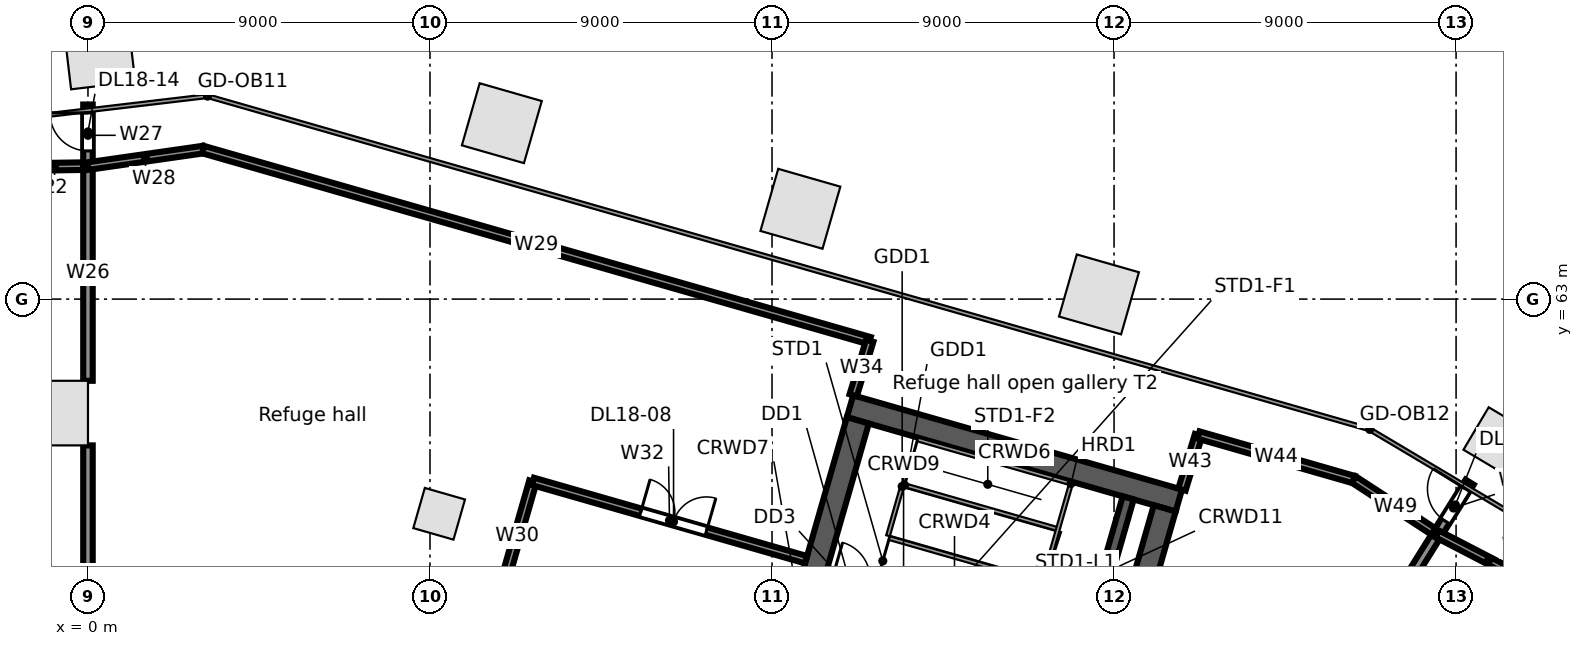
"""IFC4 building model, lengths in metres.
Left out: names, types, materials, properties, quantities, classifications, styles, units other than length and angle.
Written with IfcOpenShell. Run it as: python <this file> out.ifc"""

import sys

from ifc_helpers import new_model, si_unit, direction, frame, frame_2d, origin, origin_2d, place, context, subcontext, project, spatial, rectangle, extrude, element, fill, save


model = new_model("IFC4")
c1 = context("Model", 3, precision=1e-05, world=origin(), true_north=direction((0.0, 1.0)))
c2 = subcontext(c1, "Body", "Model", "MODEL_VIEW")
j1 = project(units=[si_unit("LENGTHUNIT", "METRE"), si_unit("PLANEANGLEUNIT", "RADIAN")], contexts=[c1])
p1 = place(None, origin())
s1 = spatial("IfcSite", under=j1, at=p1, CompositionType="ELEMENT")
p2 = place(p1, origin())
s2 = spatial("IfcBuilding", under=s1, at=p2, CompositionType="ELEMENT")
p3 = place(p2, frame((0.0, 0.0, 91.5)))
s3 = spatial("IfcBuildingStorey", under=s2, at=p3, CompositionType="ELEMENT", Elevation=91.5)
p4 = place(p3, frame((37.085, 59.262, 0.0), z_axis=(0.0, 0.0, 1.0), x_axis=(-0.859406411501, 0.511293086077, 0.0)))
e1 = element("IfcColumn", 1, at=p4, inside=s3, PredefinedType="COLUMN", context=c2, shape_type="SweptSolid", body=[
    extrude(rectangle(XDim=1.3, YDim=1.3, at=origin_2d()), origin(), (0.0, 0.0, 1.0), 5.6),
])
for number, where, z_axis, x_axis in (
    (2, (26.603, 63.124, 0.0), (0.0, 0.0, 1.0), (-0.961, 0.276, 0.0)),
    (3, (18.746, 65.376, 0.0), (0.0, 0.0, 1.0), (-0.961, 0.276, 0.0)),
    (4, (10.89, 67.629, 0.0), (0.0, 0.0, 1.0), (-0.961, 0.276, 0.0)),
    (5, (0.3, 69.464, 0.0), (0.0, 0.0, 1.0), (-0.993, -0.118, 0.0)),
    (6, (-0.85, 60.0, 0.0), (0.0, 0.0, 1.0), (0.0, 1.0, 0.0)),
):
    element("IfcColumn", number, at=place(p3, frame(where, z_axis=z_axis, x_axis=x_axis)), inside=s3, PredefinedType="COLUMN", context=c2, shape_type="SweptSolid", body=[
        extrude(rectangle(XDim=1.7, YDim=1.7, at=origin_2d()), origin(), (0.0, 0.0, 1.0), 5.6),
    ])
p5 = place(p3, frame((9.241, 57.35, 0.0), z_axis=(0.0, 0.0, 1.0), x_axis=(0.961261695938, -0.275637355817, 0.0)))
e7 = element("IfcColumn", 7, at=p5, inside=s3, PredefinedType="COLUMN", context=c2, shape_type="SweptSolid", body=[
    extrude(rectangle(XDim=1.1, YDim=1.1, at=origin_2d()), origin(), (0.0, 0.0, 1.0), 5.6),
])
p6 = place(p3, frame((20.053, 60.18, 0.0), z_axis=(0.0, 0.0, 1.0), x_axis=(0.96126248289, -0.275634611374, 0.0)))
e8 = element("IfcWall", 8, at=p6, inside=s3, PredefinedType="SOLIDWALL", context=c2, shape_type="SweptSolid", body=[
    extrude(rectangle(XDim=9.0, YDim=0.6, at=frame_2d((4.5, 0.0))), origin(), (0.0, 0.0, 1.0), 5.28),
])
p7 = place(p3, frame((17.282, 49.427, 0.0), z_axis=(0.0, 0.0, 1.0), x_axis=(0.275631631629, 0.961263337304, 0.0)))
e9 = element("IfcWall", 9, at=p7, inside=s3, PredefinedType="SOLIDWALL", context=c2, shape_type="SweptSolid", body=[
    extrude(rectangle(XDim=10.8, YDim=0.6, at=frame_2d((5.4, 0.0))), origin(), (0.0, 0.0, 1.0), 5.28),
])
p8 = place(p7, frame((4.8, 0.0, 0.0)))
e10 = element("IfcOpeningElement", 10, at=p8, cuts=e9, PredefinedType="OPENING", context=c2, shape_type="SweptSolid", body=[
    extrude(rectangle(XDim=1.2, YDim=2.1, at=frame_2d((0.6, 1.05))), frame((0.0, 0.31, 0.0), z_axis=(0.0, -1.0, 0.0), x_axis=(1.0, 0.0, 0.0)), (0.0, 0.0, 1.0), 0.62),
])
p9 = place(p3, frame((26.256, 53.876, 0.0), z_axis=(0.0, 0.0, 1.0), x_axis=(0.275612739511, 0.961268754209, 0.0)))
e11 = element("IfcWall", 11, at=p9, inside=s3, PredefinedType="SOLIDWALL", context=c2, shape_type="SweptSolid", body=[
    extrude(rectangle(XDim=4.05, YDim=0.3, at=frame_2d((2.025, 0.0))), origin(), (0.0, 0.0, 1.0), 5.28),
])
p10 = place(p3, frame((25.356, 47.112, 0.0), z_axis=(0.0, 0.0, 1.0), x_axis=(0.275631631629, 0.961263337304, 0.0)))
e12 = element("IfcWall", 12, at=p10, inside=s3, PredefinedType="SOLIDWALL", context=c2, shape_type="SweptSolid", body=[
    extrude(rectangle(XDim=10.8, YDim=0.6, at=frame_2d((5.4, 0.0))), origin(), (0.0, 0.0, 1.0), 5.28),
])
p11 = place(p10, frame((4.8, 0.0, 0.0)))
e13 = element("IfcOpeningElement", 13, at=p11, cuts=e12, PredefinedType="OPENING", context=c2, shape_type="SweptSolid", body=[
    extrude(rectangle(XDim=1.2, YDim=2.1, at=frame_2d((0.6, 1.05))), frame((0.0, 0.31, 0.0), z_axis=(0.0, -1.0, 0.0), x_axis=(1.0, 0.0, 0.0)), (0.0, 0.0, 1.0), 0.62),
])
p12 = place(p3, frame((-1.757, 66.474, 0.0), z_axis=(0.0, 0.0, 1.0), x_axis=(0.999891555363, 0.014726761827, 0.0)))
e14 = element("IfcWall", 14, at=p12, inside=s3, PredefinedType="PARTITIONING", context=c2, shape_type="SweptSolid", body=[
    extrude(rectangle(XDim=1.757, YDim=0.2, at=frame_2d((0.879, 0.0))), origin(), (0.0, 0.0, 1.0), 4.552),
])
p13 = place(p3, frame((0.0, 52.25, 0.0), z_axis=(0.0, 0.0, 1.0), x_axis=(0.0, 1.0, 0.0)))
e15 = element("IfcWall", 15, at=p13, inside=s3, PredefinedType="PARTITIONING", context=c2, shape_type="SweptSolid", body=[
    extrude(rectangle(XDim=6.9, YDim=0.25, at=frame_2d((3.45, 0.0))), origin(), (0.0, 0.0, 1.0), 5.28),
])
p14 = place(p3, frame((0.0, 60.85, 0.0), z_axis=(0.0, 0.0, 1.0), x_axis=(0.0, 1.0, 0.0)))
e16 = element("IfcWall", 16, at=p14, inside=s3, PredefinedType="PARTITIONING", context=c2, shape_type="SweptSolid", body=[
    extrude(rectangle(XDim=5.65, YDim=0.25, at=frame_2d((2.825, 0.0))), origin(), (0.0, 0.0, 1.0), 4.552),
])
p15 = place(p3, frame((0.0, 66.5, 0.0), z_axis=(0.0, 0.0, 1.0), x_axis=(0.0, 1.0, 0.0)))
e17 = element("IfcWall", 17, at=p15, inside=s3, PredefinedType="PARTITIONING", context=c2, shape_type="SweptSolid", body=[
    extrude(rectangle(XDim=1.62, YDim=0.25, at=frame_2d((0.81, 0.0))), origin(), (0.0, 0.0, 1.0), 4.552),
])
p16 = place(p15, frame((0.4, 0.0, 0.0)))
e18 = element("IfcOpeningElement", 18, at=p16, cuts=e17, PredefinedType="OPENING", context=c2, shape_type="SweptSolid", body=[
    extrude(rectangle(XDim=1.0, YDim=2.1, at=frame_2d((0.5, 1.05))), frame((0.0, 0.135, 0.0), z_axis=(0.0, -1.0, 0.0), x_axis=(1.0, 0.0, 0.0)), (0.0, 0.0, 1.0), 0.27),
])
p17 = place(p3, frame((0.0, 66.5, 0.0), z_axis=(0.0, 0.0, 1.0), x_axis=(0.989887165849, 0.1418569663, 0.0)))
e19 = element("IfcWall", 19, at=p17, inside=s3, PredefinedType="PARTITIONING", context=c2, shape_type="SweptSolid", body=[
    extrude(rectangle(XDim=3.06, YDim=0.2, at=frame_2d((1.53, 0.0))), origin(), (0.0, 0.0, 1.0), 4.342),
])
p18 = place(p3, frame((3.029, 66.934, 0.0), z_axis=(0.0, 0.0, 1.0), x_axis=(0.961266574638, -0.2756203412, 0.0)))
e20 = element("IfcWall", 20, at=p18, inside=s3, PredefinedType="PARTITIONING", context=c2, shape_type="SweptSolid", body=[
    extrude(rectangle(XDim=18.25, YDim=0.2, at=frame_2d((9.125, 0.0))), origin(), (0.0, 0.0, 1.0), 4.342),
])
p19 = place(p3, frame((10.881, 55.319, 0.0), z_axis=(0.0, 0.0, 1.0), x_axis=(0.275634611374, 0.96126248289, 0.0)))
e21 = element("IfcWall", 21, at=p19, inside=s3, PredefinedType="PARTITIONING", context=c2, shape_type="SweptSolid", body=[
    extrude(rectangle(XDim=3.0, YDim=0.2, at=frame_2d((1.5, 0.0))), origin(), (0.0, 0.0, 1.0), 4.342),
])
p20 = place(p3, frame((11.708, 58.203, 0.0), z_axis=(0.0, 0.0, 1.0), x_axis=(0.961263518588, -0.275630999402, 0.0)))
e22 = element("IfcWall", 22, at=p20, inside=s3, PredefinedType="PARTITIONING", context=c2, shape_type="SweptSolid", body=[
    extrude(rectangle(XDim=7.477, YDim=0.2, at=frame_2d((3.738, 0.0))), origin(), (0.0, 0.0, 1.0), 4.342),
])
p21 = place(p20, frame((2.95, 0.0, 0.0)))
e23 = element("IfcOpeningElement", 23, at=p21, cuts=e22, PredefinedType="OPENING", context=c2, shape_type="SweptSolid", body=[
    extrude(rectangle(XDim=1.8, YDim=2.1, at=frame_2d((0.9, 1.05))), frame((0.0, 0.11, 0.0), z_axis=(0.0, -1.0, 0.0), x_axis=(1.0, 0.0, 0.0)), (0.0, 0.0, 1.0), 0.22),
])
for number, where, z_axis, x_axis in (
    (24, (20.136, 60.468, 0.0), (0.0, 0.0, 1.0), (0.291, 0.957, 0.0)),
    (25, (28.787, 57.987, 0.0), (0.0, 0.0, 1.0), (0.29, 0.957, 0.0)),
):
    element("IfcWall", number, at=place(p3, frame(where, z_axis=z_axis, x_axis=x_axis)), inside=s3, PredefinedType="PARTITIONING", context=c2, shape_type="SweptSolid", body=[
        extrude(rectangle(XDim=1.501, YDim=0.2, at=frame_2d((0.75, 0.0))), origin(), (0.0, 0.0, 1.0), 5.28),
    ])
p22 = place(p3, frame((29.223, 59.423, 0.0), z_axis=(0.0, 0.0, 1.0), x_axis=(0.961217704803, -0.27579072496, 0.0)))
e26 = element("IfcWall", 26, at=p22, inside=s3, PredefinedType="PARTITIONING", context=c2, shape_type="SweptSolid", body=[
    extrude(rectangle(XDim=4.25, YDim=0.2, at=frame_2d((2.125, 0.0))), origin(), (0.0, 0.0, 1.0), 5.28),
])
p23 = place(p3, frame((32.59, 52.155, 0.0), z_axis=(0.0, 0.0, 1.0), x_axis=(0.529967019041, 0.848018253771, 0.0)))
e27 = element("IfcWall", 27, at=p23, inside=s3, PredefinedType="PARTITIONING", context=c2, shape_type="SweptSolid", body=[
    extrude(rectangle(XDim=5.5, YDim=0.25, at=frame_2d((2.75, 0.0))), origin(), (0.0, 0.0, 1.0), 4.342),
])
p24 = place(p3, frame((33.308, 58.251, 0.0), z_axis=(0.0, 0.0, 1.0), x_axis=(0.837749484824, -0.546054759779, 0.0)))
e28 = element("IfcWall", 28, at=p24, inside=s3, PredefinedType="PARTITIONING", context=c2, shape_type="SweptSolid", body=[
    extrude(rectangle(XDim=2.622, YDim=0.2, at=frame_2d((1.311, 0.0))), origin(), (0.0, 0.0, 1.0), 5.28),
])
p25 = place(p3, frame((35.505, 56.819, 0.0), z_axis=(0.0, 0.0, 1.0), x_axis=(0.529794245677, 0.848126203609, 0.0)))
e29 = element("IfcWall", 29, at=p25, inside=s3, PredefinedType="PARTITIONING", context=c2, shape_type="SweptSolid", body=[
    extrude(rectangle(XDim=1.608, YDim=0.25, at=frame_2d((0.804, 0.0))), origin(), (0.0, 0.0, 1.0), 4.342),
])
p26 = place(p25, frame((0.4, 0.0, 0.0)))
e30 = element("IfcOpeningElement", 30, at=p26, cuts=e29, PredefinedType="OPENING", context=c2, shape_type="SweptSolid", body=[
    extrude(rectangle(XDim=1.0, YDim=2.1, at=frame_2d((0.5, 1.05))), frame((0.0, 0.135, 0.0), z_axis=(0.0, -1.0, 0.0), x_axis=(1.0, 0.0, 0.0)), (0.0, 0.0, 1.0), 0.27),
])
p27 = place(p3, frame((35.505, 56.819, 0.0), z_axis=(0.0, 0.0, 1.0), x_axis=(0.887881146957, -0.460072895179, 0.0)))
e31 = element("IfcWall", 31, at=p27, inside=s3, PredefinedType="PARTITIONING", context=c2, shape_type="SweptSolid", body=[
    extrude(rectangle(XDim=3.034, YDim=0.2, at=frame_2d((1.517, 0.0))), origin(), (0.0, 0.0, 1.0), 4.342),
])
p28 = place(p21, origin())
e32 = element("IfcDoor", 32, at=p28, inside=s3, OperationType="DOUBLE_DOOR_SINGLE_SWING", PredefinedType="DOOR", context=c2, shape_type="SweptSolid", body=[
    extrude(rectangle(XDim=1.8, YDim=2.1, at=frame_2d((0.9, 1.05))), frame((0.0, 0.025, 0.0), z_axis=(0.0, -1.0, 0.0), x_axis=(1.0, 0.0, 0.0)), (0.0, 0.0, 1.0), 0.05),
])
fill(e23, e32)
p29 = place(p16, origin())
e33 = element("IfcDoor", 33, at=p29, inside=s3, OperationType="SINGLE_SWING_RIGHT", PredefinedType="DOOR", context=c2, shape_type="SweptSolid", body=[
    extrude(rectangle(XDim=1.0, YDim=2.1, at=frame_2d((0.5, 1.05))), frame((0.0, 0.025, 0.0), z_axis=(0.0, -1.0, 0.0), x_axis=(1.0, 0.0, 0.0)), (0.0, 0.0, 1.0), 0.05),
])
fill(e18, e33)
p30 = place(p26, origin())
e34 = element("IfcDoor", 34, at=p30, inside=s3, OperationType="SINGLE_SWING_RIGHT", PredefinedType="DOOR", context=c2, shape_type="SweptSolid", body=[
    extrude(rectangle(XDim=1.0, YDim=2.1, at=frame_2d((0.5, 1.05))), frame((0.0, 0.025, 0.0), z_axis=(0.0, -1.0, 0.0), x_axis=(1.0, 0.0, 0.0)), (0.0, 0.0, 1.0), 0.05),
])
fill(e30, e34)
save(model, sys.argv[1])
